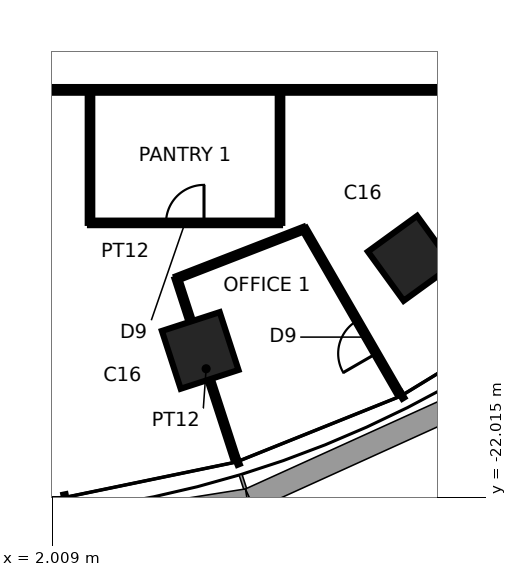
"""IFC4 building model, lengths in metres.
Left out: names, types, materials, properties, quantities, classifications, styles, units other than length and angle.
Written with IfcOpenShell. Run it as: python <this file> out.ifc"""

import sys

from ifc_helpers import new_model, si_unit, direction, frame, frame_2d, origin, origin_2d, place, context, subcontext, project, spatial, rectangle, extrude, element, fill, save


model = new_model("IFC4")
c1 = context("Model", 3, precision=1e-05, world=origin(), true_north=direction((0.0, 1.0)))
c2 = subcontext(c1, "Body", "Model", "MODEL_VIEW")
j1 = project(units=[si_unit("LENGTHUNIT", "METRE"), si_unit("PLANEANGLEUNIT", "RADIAN")], contexts=[c1])
p1 = place(None, origin())
s1 = spatial("IfcSite", under=j1, at=p1, CompositionType="ELEMENT")
p2 = place(p1, origin())
s2 = spatial("IfcBuilding", under=s1, at=p2, CompositionType="ELEMENT")
p3 = place(p2, frame((0.0, 0.0, 108.0)))
s3 = spatial("IfcBuildingStorey", under=s2, at=p3, CompositionType="ELEMENT", Elevation=108.0)
for number, where, z_axis, x_axis in (
    (1, (5.9, -18.157, 0.0), (0.0, 0.0, 1.0), (0.309, -0.951, 0.0)),
    (2, (11.43, -15.733, 0.0), (0.0, 0.0, 1.0), (0.588, -0.809, 0.0)),
):
    element("IfcColumn", number, at=place(p3, frame(where, z_axis=z_axis, x_axis=x_axis)), inside=s3, PredefinedType="COLUMN", context=c2, shape_type="SweptSolid", body=[
        extrude(rectangle(XDim=1.6, YDim=1.6, at=origin_2d()), origin(), (0.0, 0.0, 1.0), 3.9),
    ])
p4 = place(p3, frame((-16.0, -11.3, 0.0), z_axis=(0.0, 0.0, 1.0), x_axis=(1.0, 0.0, 0.0)))
e3 = element("IfcWall", 3, at=p4, inside=s3, PredefinedType="PARTITIONING", context=c2, shape_type="SweptSolid", body=[
    extrude(rectangle(XDim=32.0, YDim=0.15, at=frame_2d((16.0, 0.0))), origin(), (0.0, 0.0, 1.0), 3.74),
])
p5 = place(p3, frame((3.0, -11.3, 0.0), z_axis=(0.0, 0.0, 1.0), x_axis=(0.0, -1.0, 0.0)))
e4 = element("IfcWall", 4, at=p5, inside=s3, PredefinedType="PARTITIONING", context=c2, shape_type="SweptSolid", body=[
    extrude(rectangle(XDim=3.5, YDim=0.12, at=frame_2d((1.75, 0.0))), origin(), (0.0, 0.0, 1.0), 3.74),
])
p6 = place(p3, frame((5.283, -16.261, 0.0), z_axis=(0.0, 0.0, 1.0), x_axis=(0.309040803421, -0.951048779938, 0.0)))
e5 = element("IfcWall", 5, at=p6, inside=s3, PredefinedType="PARTITIONING", context=c2, shape_type="SweptSolid", body=[
    extrude(rectangle(XDim=5.0, YDim=0.12, at=frame_2d((2.5, 0.0))), origin(), (0.0, 0.0, 1.0), 2.94),
])
p7 = place(p3, frame((3.0, -14.8, 0.0), z_axis=(0.0, 0.0, 1.0), x_axis=(1.0, 0.0, 0.0)))
e6 = element("IfcWall", 6, at=p7, inside=s3, PredefinedType="PARTITIONING", context=c2, shape_type="SweptSolid", body=[
    extrude(rectangle(XDim=5.0, YDim=0.12, at=frame_2d((2.5, 0.0))), origin(), (0.0, 0.0, 1.0), 3.74),
])
p8 = place(p7, frame((2.0, 0.0, 0.0)))
e7 = element("IfcOpeningElement", 7, at=p8, cuts=e6, PredefinedType="OPENING", context=c2, shape_type="SweptSolid", body=[
    extrude(rectangle(XDim=1.0, YDim=2.4, at=frame_2d((0.5, 1.2))), frame((0.0, 0.07, 0.0), z_axis=(0.0, -1.0, 0.0), x_axis=(1.0, 0.0, 0.0)), (0.0, 0.0, 1.0), 0.14),
])
p9 = place(p3, frame((8.637, -14.959, 0.0), z_axis=(0.0, 0.0, 1.0), x_axis=(-0.932196869483, -0.361951649432, 0.0)))
e8 = element("IfcWall", 8, at=p9, inside=s3, PredefinedType="PARTITIONING", context=c2, shape_type="SweptSolid", body=[
    extrude(rectangle(XDim=3.597, YDim=0.12, at=frame_2d((1.799, 0.0))), origin(), (0.0, 0.0, 1.0), 3.74),
])
p10 = place(p3, frame((11.137, -19.289, 0.0), z_axis=(0.0, 0.0, 1.0), x_axis=(-0.499983091616, 0.866035165624, 0.0)))
e9 = element("IfcWall", 9, at=p10, inside=s3, PredefinedType="PARTITIONING", context=c2, shape_type="SweptSolid", body=[
    extrude(rectangle(XDim=5.0, YDim=0.12, at=frame_2d((2.5, 0.0))), origin(), (0.0, 0.0, 1.0), 3.74),
])
p11 = place(p10, frame((1.213, 0.0, 0.0)))
e10 = element("IfcOpeningElement", 10, at=p11, cuts=e9, PredefinedType="OPENING", context=c2, shape_type="SweptSolid", body=[
    extrude(rectangle(XDim=1.0, YDim=2.4, at=frame_2d((0.5, 1.2))), frame((0.0, 0.07, 0.0), z_axis=(0.0, -1.0, 0.0), x_axis=(1.0, 0.0, 0.0)), (0.0, 0.0, 1.0), 0.14),
])
p12 = place(p3, frame((8.0, -14.8, 0.0), z_axis=(0.0, 0.0, 1.0), x_axis=(0.0, 1.0, 0.0)))
e11 = element("IfcWall", 11, at=p12, inside=s3, PredefinedType="PARTITIONING", context=c2, shape_type="SweptSolid", body=[
    extrude(rectangle(XDim=3.5, YDim=0.12, at=frame_2d((1.75, 0.0))), origin(), (0.0, 0.0, 1.0), 3.74),
])
p13 = place(p11, origin())
e12 = element("IfcDoor", 12, at=p13, inside=s3, OperationType="SINGLE_SWING_LEFT", PredefinedType="DOOR", context=c2, shape_type="SweptSolid", body=[
    extrude(rectangle(XDim=1.0, YDim=2.4, at=frame_2d((0.5, 1.2))), frame((0.0, 0.025, 0.0), z_axis=(0.0, -1.0, 0.0), x_axis=(1.0, 0.0, 0.0)), (0.0, 0.0, 1.0), 0.05),
])
fill(e10, e12)
p14 = place(p8, origin())
e13 = element("IfcDoor", 13, at=p14, inside=s3, OperationType="SINGLE_SWING_RIGHT", PredefinedType="DOOR", context=c2, shape_type="SweptSolid", body=[
    extrude(rectangle(XDim=1.0, YDim=2.4, at=frame_2d((0.5, 1.2))), frame((0.0, 0.025, 0.0), z_axis=(0.0, -1.0, 0.0), x_axis=(1.0, 0.0, 0.0)), (0.0, 0.0, 1.0), 0.05),
])
fill(e7, e13)
save(model, sys.argv[1])
